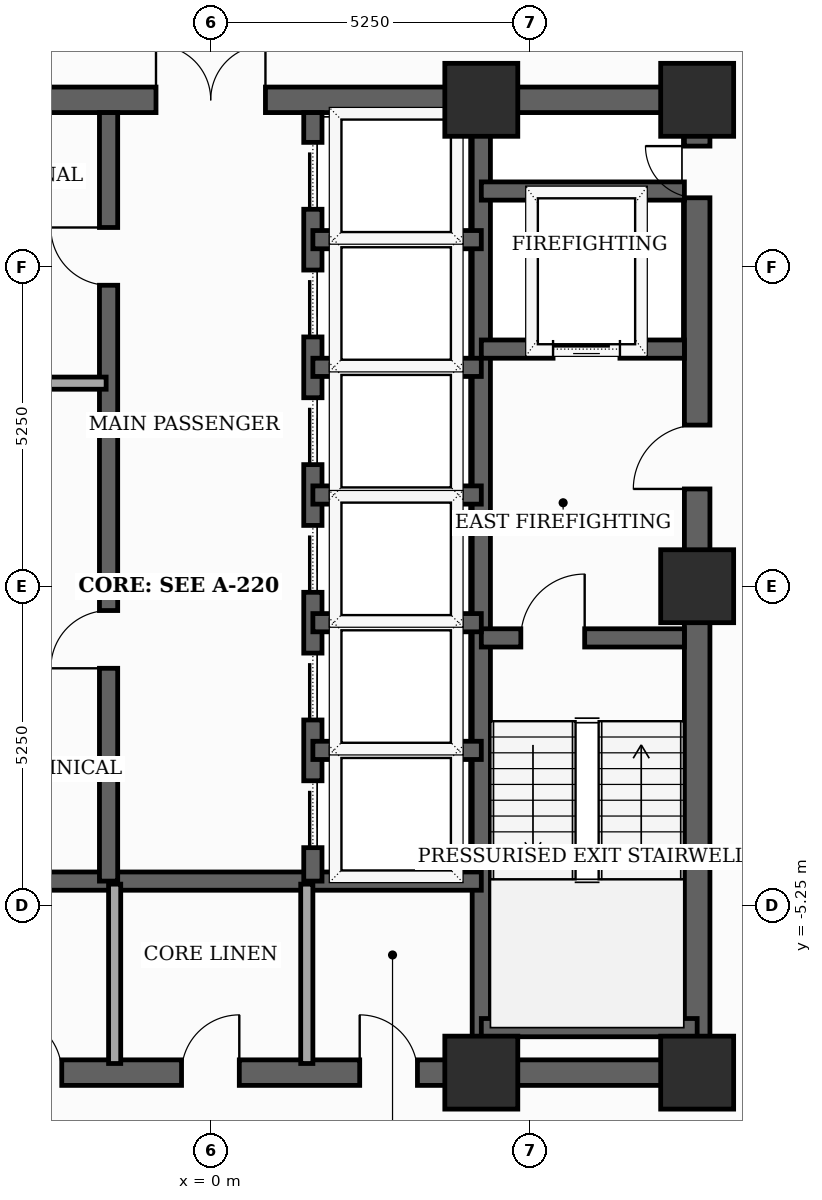
"""IFC4 building model, lengths in metres.
Left out: names, types, materials, properties, quantities, classifications, styles, units other than length and angle.
Written with IfcOpenShell. Run it as: python <this file> out.ifc"""

import sys

from ifc_helpers import new_model, si_unit, direction, frame, frame_2d, origin, origin_2d, place, context, subcontext, project, spatial, rectangle, extrude, element, fill, save


model = new_model("IFC4")
c1 = context("Model", 3, precision=1e-05, world=origin(), true_north=direction((0.0, 1.0)))
c2 = subcontext(c1, "Body", "Model", "MODEL_VIEW")
j1 = project(units=[si_unit("LENGTHUNIT", "METRE"), si_unit("PLANEANGLEUNIT", "RADIAN")], contexts=[c1])
p1 = place(None, origin())
s1 = spatial("IfcSite", under=j1, at=p1, CompositionType="ELEMENT")
p2 = place(p1, origin())
s2 = spatial("IfcBuilding", under=s1, at=p2, CompositionType="ELEMENT")
p3 = place(p2, frame((0.0, 0.0, 199.0)))
s3 = spatial("IfcBuildingStorey", under=s2, at=p3, CompositionType="ELEMENT", Elevation=199.0)
for number, where, z_axis, x_axis in (
    (1, (4.45, -8.0, 0.0), (0.0, 0.0, 1.0), (1.0, 0.0, 0.0)),
    (2, (8.0, -8.0, 0.0), (0.0, 0.0, 1.0), (1.0, 0.0, 0.0)),
    (3, (8.0, 0.0, 0.0), (0.0, 0.0, 1.0), (1.0, 0.0, 0.0)),
    (4, (8.0, 8.0, 0.0), (0.0, 0.0, 1.0), (1.0, 0.0, 0.0)),
    (5, (4.45, 8.0, 0.0), (0.0, 0.0, 1.0), (1.0, 0.0, 0.0)),
):
    element("IfcColumn", number, at=place(p3, frame(where, z_axis=z_axis, x_axis=x_axis)), inside=s3, PredefinedType="COLUMN", context=c2, shape_type="SweptSolid", body=[
        extrude(rectangle(XDim=1.2, YDim=1.2, at=origin_2d()), origin(), (0.0, 0.0, 1.0), 3.7),
    ])
p4 = place(p3, frame((8.0, -8.0, 0.0), z_axis=(0.0, 0.0, 1.0), x_axis=(0.0, 1.0, 0.0)))
e6 = element("IfcWall", 6, at=p4, inside=s3, PredefinedType="SHEAR", context=c2, shape_type="SweptSolid", body=[
    extrude(rectangle(XDim=16.0, YDim=0.42, at=frame_2d((8.0, 0.0))), origin(), (0.0, 0.0, 1.0), 3.5),
])
p5 = place(p4, frame((9.6, 0.0, 0.0)))
e7 = element("IfcOpeningElement", 7, at=p5, cuts=e6, PredefinedType="OPENING", context=c2, shape_type="SweptSolid", body=[
    extrude(rectangle(XDim=1.05, YDim=2.15, at=frame_2d((0.525, 1.075))), frame((0.0, 0.22, 0.0), z_axis=(0.0, -1.0, 0.0), x_axis=(1.0, 0.0, 0.0)), (0.0, 0.0, 1.0), 0.44),
])
p6 = place(p4, frame((14.389, 0.0, 0.0)))
e8 = element("IfcOpeningElement", 8, at=p6, cuts=e6, PredefinedType="OPENING", context=c2, shape_type="SweptSolid", body=[
    extrude(rectangle(XDim=0.85, YDim=2.02, at=frame_2d((0.425, 1.01))), frame((0.0, 0.22, 0.0), z_axis=(0.0, -1.0, 0.0), x_axis=(1.0, 0.0, 0.0)), (0.0, 0.0, 1.0), 0.44),
])
p7 = place(p3, frame((-8.0, -8.0, 0.0), z_axis=(0.0, 0.0, 1.0), x_axis=(1.0, 0.0, 0.0)))
e9 = element("IfcWall", 9, at=p7, inside=s3, PredefinedType="SHEAR", context=c2, shape_type="SweptSolid", body=[
    extrude(rectangle(XDim=16.0, YDim=0.42, at=frame_2d((8.0, 0.0))), origin(), (0.0, 0.0, 1.0), 3.5),
])
p8 = place(p7, frame((4.6, 0.0, 0.0)))
e10 = element("IfcOpeningElement", 10, at=p8, cuts=e9, PredefinedType="OPENING", context=c2, shape_type="SweptSolid", body=[
    extrude(rectangle(XDim=0.95, YDim=2.1, at=frame_2d((0.475, 1.05))), frame((0.0, 0.22, 0.0), z_axis=(0.0, -1.0, 0.0), x_axis=(1.0, 0.0, 0.0)), (0.0, 0.0, 1.0), 0.44),
])
p9 = place(p7, frame((7.52, 0.0, 0.0)))
e11 = element("IfcOpeningElement", 11, at=p9, cuts=e9, PredefinedType="OPENING", context=c2, shape_type="SweptSolid", body=[
    extrude(rectangle(XDim=0.95, YDim=2.1, at=frame_2d((0.475, 1.05))), frame((0.0, 0.22, 0.0), z_axis=(0.0, -1.0, 0.0), x_axis=(1.0, 0.0, 0.0)), (0.0, 0.0, 1.0), 0.44),
])
p10 = place(p7, frame((10.45, 0.0, 0.0)))
e12 = element("IfcOpeningElement", 12, at=p10, cuts=e9, PredefinedType="OPENING", context=c2, shape_type="SweptSolid", body=[
    extrude(rectangle(XDim=0.95, YDim=2.1, at=frame_2d((0.475, 1.05))), frame((0.0, 0.22, 0.0), z_axis=(0.0, -1.0, 0.0), x_axis=(1.0, 0.0, 0.0)), (0.0, 0.0, 1.0), 0.44),
])
p11 = place(p3, frame((-8.0, 8.0, 0.0), z_axis=(0.0, 0.0, 1.0), x_axis=(1.0, 0.0, 0.0)))
e13 = element("IfcWall", 13, at=p11, inside=s3, PredefinedType="SHEAR", context=c2, shape_type="SweptSolid", body=[
    extrude(rectangle(XDim=16.0, YDim=0.42, at=frame_2d((8.0, 0.0))), origin(), (0.0, 0.0, 1.0), 3.5),
])
p12 = place(p11, frame((7.1, 0.0, 0.0)))
e14 = element("IfcOpeningElement", 14, at=p12, cuts=e13, PredefinedType="OPENING", context=c2, shape_type="SweptSolid", body=[
    extrude(rectangle(XDim=1.8, YDim=2.15, at=frame_2d((0.9, 1.075))), frame((0.0, 0.22, 0.0), z_axis=(0.0, -1.0, 0.0), x_axis=(1.0, 0.0, 0.0)), (0.0, 0.0, 1.0), 0.44),
])
p13 = place(p3, frame((4.45, -7.79, 0.0), z_axis=(0.0, 0.0, 1.0), x_axis=(0.0, 1.0, 0.0)))
e15 = element("IfcWall", 15, at=p13, inside=s3, PredefinedType="SHEAR", context=c2, shape_type="SweptSolid", body=[
    extrude(rectangle(XDim=15.58, YDim=0.3, at=frame_2d((7.79, 0.0))), origin(), (0.0, 0.0, 1.0), 3.5),
])
p14 = place(p3, frame((4.45, -0.85, 0.0), z_axis=(0.0, 0.0, 1.0), x_axis=(1.0, 0.0, 0.0)))
e16 = element("IfcWall", 16, at=p14, inside=s3, PredefinedType="SHEAR", context=c2, shape_type="SweptSolid", body=[
    extrude(rectangle(XDim=3.34, YDim=0.3, at=frame_2d((1.67, 0.0))), origin(), (0.0, 0.0, 1.0), 3.5),
])
p15 = place(p14, frame((0.65, 0.0, 0.0)))
e17 = element("IfcOpeningElement", 17, at=p15, cuts=e16, PredefinedType="OPENING", context=c2, shape_type="SweptSolid", body=[
    extrude(rectangle(XDim=1.05, YDim=2.15, at=frame_2d((0.525, 1.075))), frame((0.0, 0.16, 0.0), z_axis=(0.0, -1.0, 0.0), x_axis=(1.0, 0.0, 0.0)), (0.0, 0.0, 1.0), 0.32),
])
p16 = place(p3, frame((4.45, -7.26, 0.0), z_axis=(0.0, 0.0, 1.0), x_axis=(1.0, 0.0, 0.0)))
e18 = element("IfcWall", 18, at=p16, inside=s3, PredefinedType="SHEAR", context=c2, shape_type="SweptSolid", body=[
    extrude(rectangle(XDim=3.55, YDim=0.3, at=frame_2d((1.775, 0.0))), origin(), (0.0, 0.0, 1.0), 3.5),
])
p17 = place(p3, frame((4.45, 3.9, 0.0), z_axis=(0.0, 0.0, 1.0), x_axis=(1.0, 0.0, 0.0)))
e19 = element("IfcWall", 19, at=p17, inside=s3, PredefinedType="SHEAR", context=c2, shape_type="SweptSolid", body=[
    extrude(rectangle(XDim=3.34, YDim=0.3, at=frame_2d((1.67, 0.0))), origin(), (0.0, 0.0, 1.0), 3.5),
])
p18 = place(p17, frame((1.18, 0.0, 0.0)))
e20 = element("IfcOpeningElement", 20, at=p18, cuts=e19, PredefinedType="OPENING", context=c2, shape_type="SweptSolid", body=[
    extrude(rectangle(XDim=1.1, YDim=2.1, at=frame_2d((0.55, 1.05))), frame((0.0, 0.16, 0.0), z_axis=(0.0, -1.0, 0.0), x_axis=(1.0, 0.0, 0.0)), (0.0, 0.0, 1.0), 0.32),
])
p19 = place(p3, frame((4.45, 6.5, 0.0), z_axis=(0.0, 0.0, 1.0), x_axis=(1.0, 0.0, 0.0)))
e21 = element("IfcWall", 21, at=p19, inside=s3, PredefinedType="SHEAR", context=c2, shape_type="SweptSolid", body=[
    extrude(rectangle(XDim=3.34, YDim=0.3, at=frame_2d((1.67, 0.0))), origin(), (0.0, 0.0, 1.0), 3.5),
])
p20 = place(p3, frame((-4.45, -4.85, 0.0), z_axis=(0.0, 0.0, 1.0), x_axis=(1.0, 0.0, 0.0)))
e22 = element("IfcWall", 22, at=p20, inside=s3, PredefinedType="SHEAR", context=c2, shape_type="SweptSolid", body=[
    extrude(rectangle(XDim=8.9, YDim=0.3, at=frame_2d((4.45, 0.0))), origin(), (0.0, 0.0, 1.0), 3.5),
])
p21 = place(p3, frame((-1.68, -4.85, 0.0), z_axis=(0.0, 0.0, 1.0), x_axis=(0.0, 1.0, 0.0)))
e23 = element("IfcWall", 23, at=p21, inside=s3, PredefinedType="SHEAR", context=c2, shape_type="SweptSolid", body=[
    extrude(rectangle(XDim=12.64, YDim=0.3, at=frame_2d((6.32, 0.0))), origin(), (0.0, 0.0, 1.0), 3.5),
])
p22 = place(p21, frame((3.5, 0.0, 0.0)))
e24 = element("IfcOpeningElement", 24, at=p22, cuts=e23, PredefinedType="OPENING", context=c2, shape_type="SweptSolid", body=[
    extrude(rectangle(XDim=0.95, YDim=2.1, at=frame_2d((0.475, 1.05))), frame((0.0, 0.16, 0.0), z_axis=(0.0, -1.0, 0.0), x_axis=(1.0, 0.0, 0.0)), (0.0, 0.0, 1.0), 0.32),
])
p23 = place(p21, frame((9.8, 0.0, 0.0)))
e25 = element("IfcOpeningElement", 25, at=p23, cuts=e23, PredefinedType="OPENING", context=c2, shape_type="SweptSolid", body=[
    extrude(rectangle(XDim=0.95, YDim=2.1, at=frame_2d((0.475, 1.05))), frame((0.0, 0.16, 0.0), z_axis=(0.0, -1.0, 0.0), x_axis=(1.0, 0.0, 0.0)), (0.0, 0.0, 1.0), 0.32),
])
p24 = place(p3, frame((1.68, -4.85, 0.0), z_axis=(0.0, 0.0, 1.0), x_axis=(0.0, 1.0, 0.0)))
e26 = element("IfcWall", 26, at=p24, inside=s3, PredefinedType="SHEAR", context=c2, shape_type="SweptSolid", body=[
    extrude(rectangle(XDim=12.64, YDim=0.3, at=frame_2d((6.32, 0.0))), origin(), (0.0, 0.0, 1.0), 3.5),
])
p25 = place(p24, frame((0.55, 0.0, 0.0)))
e27 = element("IfcOpeningElement", 27, at=p25, cuts=e26, PredefinedType="OPENING", context=c2, shape_type="SweptSolid", body=[
    extrude(rectangle(XDim=1.1, YDim=2.1, at=frame_2d((0.55, 1.05))), frame((0.0, 0.16, 0.0), z_axis=(0.0, -1.0, 0.0), x_axis=(1.0, 0.0, 0.0)), (0.0, 0.0, 1.0), 0.32),
])
p26 = place(p24, frame((2.65, 0.0, 0.0)))
e28 = element("IfcOpeningElement", 28, at=p26, cuts=e26, PredefinedType="OPENING", context=c2, shape_type="SweptSolid", body=[
    extrude(rectangle(XDim=1.1, YDim=2.1, at=frame_2d((0.55, 1.05))), frame((0.0, 0.16, 0.0), z_axis=(0.0, -1.0, 0.0), x_axis=(1.0, 0.0, 0.0)), (0.0, 0.0, 1.0), 0.32),
])
p27 = place(p24, frame((4.75, 0.0, 0.0)))
e29 = element("IfcOpeningElement", 29, at=p27, cuts=e26, PredefinedType="OPENING", context=c2, shape_type="SweptSolid", body=[
    extrude(rectangle(XDim=1.1, YDim=2.1, at=frame_2d((0.55, 1.05))), frame((0.0, 0.16, 0.0), z_axis=(0.0, -1.0, 0.0), x_axis=(1.0, 0.0, 0.0)), (0.0, 0.0, 1.0), 0.32),
])
p28 = place(p24, frame((6.85, 0.0, 0.0)))
e30 = element("IfcOpeningElement", 30, at=p28, cuts=e26, PredefinedType="OPENING", context=c2, shape_type="SweptSolid", body=[
    extrude(rectangle(XDim=1.1, YDim=2.1, at=frame_2d((0.55, 1.05))), frame((0.0, 0.16, 0.0), z_axis=(0.0, -1.0, 0.0), x_axis=(1.0, 0.0, 0.0)), (0.0, 0.0, 1.0), 0.32),
])
p29 = place(p24, frame((8.95, 0.0, 0.0)))
e31 = element("IfcOpeningElement", 31, at=p29, cuts=e26, PredefinedType="OPENING", context=c2, shape_type="SweptSolid", body=[
    extrude(rectangle(XDim=1.1, YDim=2.1, at=frame_2d((0.55, 1.05))), frame((0.0, 0.16, 0.0), z_axis=(0.0, -1.0, 0.0), x_axis=(1.0, 0.0, 0.0)), (0.0, 0.0, 1.0), 0.32),
])
p30 = place(p24, frame((11.05, 0.0, 0.0)))
e32 = element("IfcOpeningElement", 32, at=p30, cuts=e26, PredefinedType="OPENING", context=c2, shape_type="SweptSolid", body=[
    extrude(rectangle(XDim=1.1, YDim=2.1, at=frame_2d((0.55, 1.05))), frame((0.0, 0.16, 0.0), z_axis=(0.0, -1.0, 0.0), x_axis=(1.0, 0.0, 0.0)), (0.0, 0.0, 1.0), 0.32),
])
for number, where, z_axis, x_axis in (
    (33, (1.68, 1.5, 0.0), (0.0, 0.0, 1.0), (1.0, 0.0, 0.0)),
    (34, (1.68, 3.6, 0.0), (0.0, 0.0, 1.0), (1.0, 0.0, 0.0)),
    (35, (1.68, 5.7, 0.0), (0.0, 0.0, 1.0), (1.0, 0.0, 0.0)),
    (36, (1.68, -2.7, 0.0), (0.0, 0.0, 1.0), (1.0, 0.0, 0.0)),
    (37, (1.68, -0.6, 0.0), (0.0, 0.0, 1.0), (1.0, 0.0, 0.0)),
):
    element("IfcWall", number, at=place(p3, frame(where, z_axis=z_axis, x_axis=x_axis)), inside=s3, PredefinedType="SHEAR", context=c2, shape_type="SweptSolid", body=[
        extrude(rectangle(XDim=2.77, YDim=0.3, at=frame_2d((1.385, 0.0))), origin(), (0.0, 0.0, 1.0), 3.5),
    ])
for number, where, z_axis, x_axis in (
    (38, (-1.58, -7.85, 0.0), (0.0, 0.0, 1.0), (0.0, 1.0, 0.0)),
    (39, (1.58, -7.85, 0.0), (0.0, 0.0, 1.0), (0.0, 1.0, 0.0)),
):
    element("IfcWall", number, at=place(p3, frame(where, z_axis=z_axis, x_axis=x_axis)), inside=s3, PredefinedType="SOLIDWALL", context=c2, shape_type="SweptSolid", body=[
        extrude(rectangle(XDim=2.95, YDim=0.2, at=frame_2d((1.475, 0.0))), origin(), (0.0, 0.0, 1.0), 2.885),
    ])
p31 = place(p3, frame((-4.4, 3.34, 0.0), z_axis=(0.0, 0.0, 1.0), x_axis=(1.0, 0.0, 0.0)))
e40 = element("IfcWall", 40, at=p31, inside=s3, PredefinedType="SOLIDWALL", context=c2, shape_type="SweptSolid", body=[
    extrude(rectangle(XDim=2.68, YDim=0.2, at=frame_2d((1.34, 0.0))), origin(), (0.0, 0.0, 1.0), 3.5),
])
p32 = place(p5, origin())
e41 = element("IfcDoor", 41, at=p32, inside=s3, OperationType="SINGLE_SWING_LEFT", PredefinedType="DOOR", context=c2, shape_type="SweptSolid", body=[
    extrude(rectangle(XDim=1.05, YDim=2.15, at=frame_2d((0.525, 1.075))), frame((0.0, 0.025, 0.0), z_axis=(0.0, -1.0, 0.0), x_axis=(1.0, 0.0, 0.0)), (0.0, 0.0, 1.0), 0.05),
])
fill(e7, e41)
p33 = place(p6, origin())
e42 = element("IfcDoor", 42, at=p33, inside=s3, OperationType="SINGLE_SWING_RIGHT", PredefinedType="TRAPDOOR", context=c2, shape_type="SweptSolid", body=[
    extrude(rectangle(XDim=0.85, YDim=2.02, at=frame_2d((0.425, 1.01))), frame((0.0, 0.025, 0.0), z_axis=(0.0, -1.0, 0.0), x_axis=(1.0, 0.0, 0.0)), (0.0, 0.0, 1.0), 0.05),
])
fill(e8, e42)
p34 = place(p8, origin())
e43 = element("IfcDoor", 43, at=p34, inside=s3, OperationType="SINGLE_SWING_LEFT", PredefinedType="DOOR", context=c2, shape_type="SweptSolid", body=[
    extrude(rectangle(XDim=0.95, YDim=2.1, at=frame_2d((0.475, 1.05))), frame((0.0, 0.025, 0.0), z_axis=(0.0, -1.0, 0.0), x_axis=(1.0, 0.0, 0.0)), (0.0, 0.0, 1.0), 0.05),
])
fill(e10, e43)
p35 = place(p9, origin())
e44 = element("IfcDoor", 44, at=p35, inside=s3, OperationType="SINGLE_SWING_RIGHT", PredefinedType="DOOR", context=c2, shape_type="SweptSolid", body=[
    extrude(rectangle(XDim=0.95, YDim=2.1, at=frame_2d((0.475, 1.05))), frame((0.0, 0.025, 0.0), z_axis=(0.0, -1.0, 0.0), x_axis=(1.0, 0.0, 0.0)), (0.0, 0.0, 1.0), 0.05),
])
fill(e11, e44)
p36 = place(p10, origin())
e45 = element("IfcDoor", 45, at=p36, inside=s3, OperationType="SINGLE_SWING_LEFT", PredefinedType="DOOR", context=c2, shape_type="SweptSolid", body=[
    extrude(rectangle(XDim=0.95, YDim=2.1, at=frame_2d((0.475, 1.05))), frame((0.0, 0.025, 0.0), z_axis=(0.0, -1.0, 0.0), x_axis=(1.0, 0.0, 0.0)), (0.0, 0.0, 1.0), 0.05),
])
fill(e12, e45)
p37 = place(p12, origin())
e46 = element("IfcDoor", 46, at=p37, inside=s3, OperationType="DOUBLE_DOOR_SINGLE_SWING", PredefinedType="DOOR", context=c2, shape_type="SweptSolid", body=[
    extrude(rectangle(XDim=1.8, YDim=2.15, at=frame_2d((0.9, 1.075))), frame((0.0, 0.025, 0.0), z_axis=(0.0, -1.0, 0.0), x_axis=(1.0, 0.0, 0.0)), (0.0, 0.0, 1.0), 0.05),
])
fill(e14, e46)
p38 = place(p15, origin())
e47 = element("IfcDoor", 47, at=p38, inside=s3, OperationType="SINGLE_SWING_RIGHT", PredefinedType="DOOR", context=c2, shape_type="SweptSolid", body=[
    extrude(rectangle(XDim=1.05, YDim=2.15, at=frame_2d((0.525, 1.075))), frame((0.0, 0.025, 0.0), z_axis=(0.0, -1.0, 0.0), x_axis=(1.0, 0.0, 0.0)), (0.0, 0.0, 1.0), 0.05),
])
fill(e17, e47)
p39 = place(p18, origin())
e48 = element("IfcDoor", 48, at=p39, inside=s3, OperationType="SLIDING_TO_LEFT", PredefinedType="DOOR", context=c2, shape_type="SweptSolid", body=[
    extrude(rectangle(XDim=1.1, YDim=2.1, at=frame_2d((0.55, 1.05))), frame((0.0, 0.025, 0.0), z_axis=(0.0, -1.0, 0.0), x_axis=(1.0, 0.0, 0.0)), (0.0, 0.0, 1.0), 0.05),
])
fill(e20, e48)
p40 = place(p22, origin())
e49 = element("IfcDoor", 49, at=p40, inside=s3, OperationType="SINGLE_SWING_LEFT", PredefinedType="DOOR", context=c2, shape_type="SweptSolid", body=[
    extrude(rectangle(XDim=0.95, YDim=2.1, at=frame_2d((0.475, 1.05))), frame((0.0, 0.025, 0.0), z_axis=(0.0, -1.0, 0.0), x_axis=(1.0, 0.0, 0.0)), (0.0, 0.0, 1.0), 0.05),
])
fill(e24, e49)
p41 = place(p23, origin())
e50 = element("IfcDoor", 50, at=p41, inside=s3, OperationType="SINGLE_SWING_RIGHT", PredefinedType="DOOR", context=c2, shape_type="SweptSolid", body=[
    extrude(rectangle(XDim=0.95, YDim=2.1, at=frame_2d((0.475, 1.05))), frame((0.0, 0.025, 0.0), z_axis=(0.0, -1.0, 0.0), x_axis=(1.0, 0.0, 0.0)), (0.0, 0.0, 1.0), 0.05),
])
fill(e25, e50)
p42 = place(p25, origin())
e51 = element("IfcDoor", 51, at=p42, inside=s3, OperationType="SLIDING_TO_LEFT", PredefinedType="DOOR", context=c2, shape_type="SweptSolid", body=[
    extrude(rectangle(XDim=1.1, YDim=2.1, at=frame_2d((0.55, 1.05))), frame((0.0, 0.025, 0.0), z_axis=(0.0, -1.0, 0.0), x_axis=(1.0, 0.0, 0.0)), (0.0, 0.0, 1.0), 0.05),
])
fill(e27, e51)
p43 = place(p26, origin())
e52 = element("IfcDoor", 52, at=p43, inside=s3, OperationType="SLIDING_TO_LEFT", PredefinedType="DOOR", context=c2, shape_type="SweptSolid", body=[
    extrude(rectangle(XDim=1.1, YDim=2.1, at=frame_2d((0.55, 1.05))), frame((0.0, 0.025, 0.0), z_axis=(0.0, -1.0, 0.0), x_axis=(1.0, 0.0, 0.0)), (0.0, 0.0, 1.0), 0.05),
])
fill(e28, e52)
p44 = place(p27, origin())
e53 = element("IfcDoor", 53, at=p44, inside=s3, OperationType="SLIDING_TO_LEFT", PredefinedType="DOOR", context=c2, shape_type="SweptSolid", body=[
    extrude(rectangle(XDim=1.1, YDim=2.1, at=frame_2d((0.55, 1.05))), frame((0.0, 0.025, 0.0), z_axis=(0.0, -1.0, 0.0), x_axis=(1.0, 0.0, 0.0)), (0.0, 0.0, 1.0), 0.05),
])
fill(e29, e53)
p45 = place(p28, origin())
e54 = element("IfcDoor", 54, at=p45, inside=s3, OperationType="SLIDING_TO_LEFT", PredefinedType="DOOR", context=c2, shape_type="SweptSolid", body=[
    extrude(rectangle(XDim=1.1, YDim=2.1, at=frame_2d((0.55, 1.05))), frame((0.0, 0.025, 0.0), z_axis=(0.0, -1.0, 0.0), x_axis=(1.0, 0.0, 0.0)), (0.0, 0.0, 1.0), 0.05),
])
fill(e30, e54)
p46 = place(p29, origin())
e55 = element("IfcDoor", 55, at=p46, inside=s3, OperationType="SLIDING_TO_LEFT", PredefinedType="DOOR", context=c2, shape_type="SweptSolid", body=[
    extrude(rectangle(XDim=1.1, YDim=2.1, at=frame_2d((0.55, 1.05))), frame((0.0, 0.025, 0.0), z_axis=(0.0, -1.0, 0.0), x_axis=(1.0, 0.0, 0.0)), (0.0, 0.0, 1.0), 0.05),
])
fill(e31, e55)
p47 = place(p30, origin())
e56 = element("IfcDoor", 56, at=p47, inside=s3, OperationType="SLIDING_TO_LEFT", PredefinedType="DOOR", context=c2, shape_type="SweptSolid", body=[
    extrude(rectangle(XDim=1.1, YDim=2.1, at=frame_2d((0.55, 1.05))), frame((0.0, 0.025, 0.0), z_axis=(0.0, -1.0, 0.0), x_axis=(1.0, 0.0, 0.0)), (0.0, 0.0, 1.0), 0.05),
])
fill(e32, e56)
save(model, sys.argv[1])
